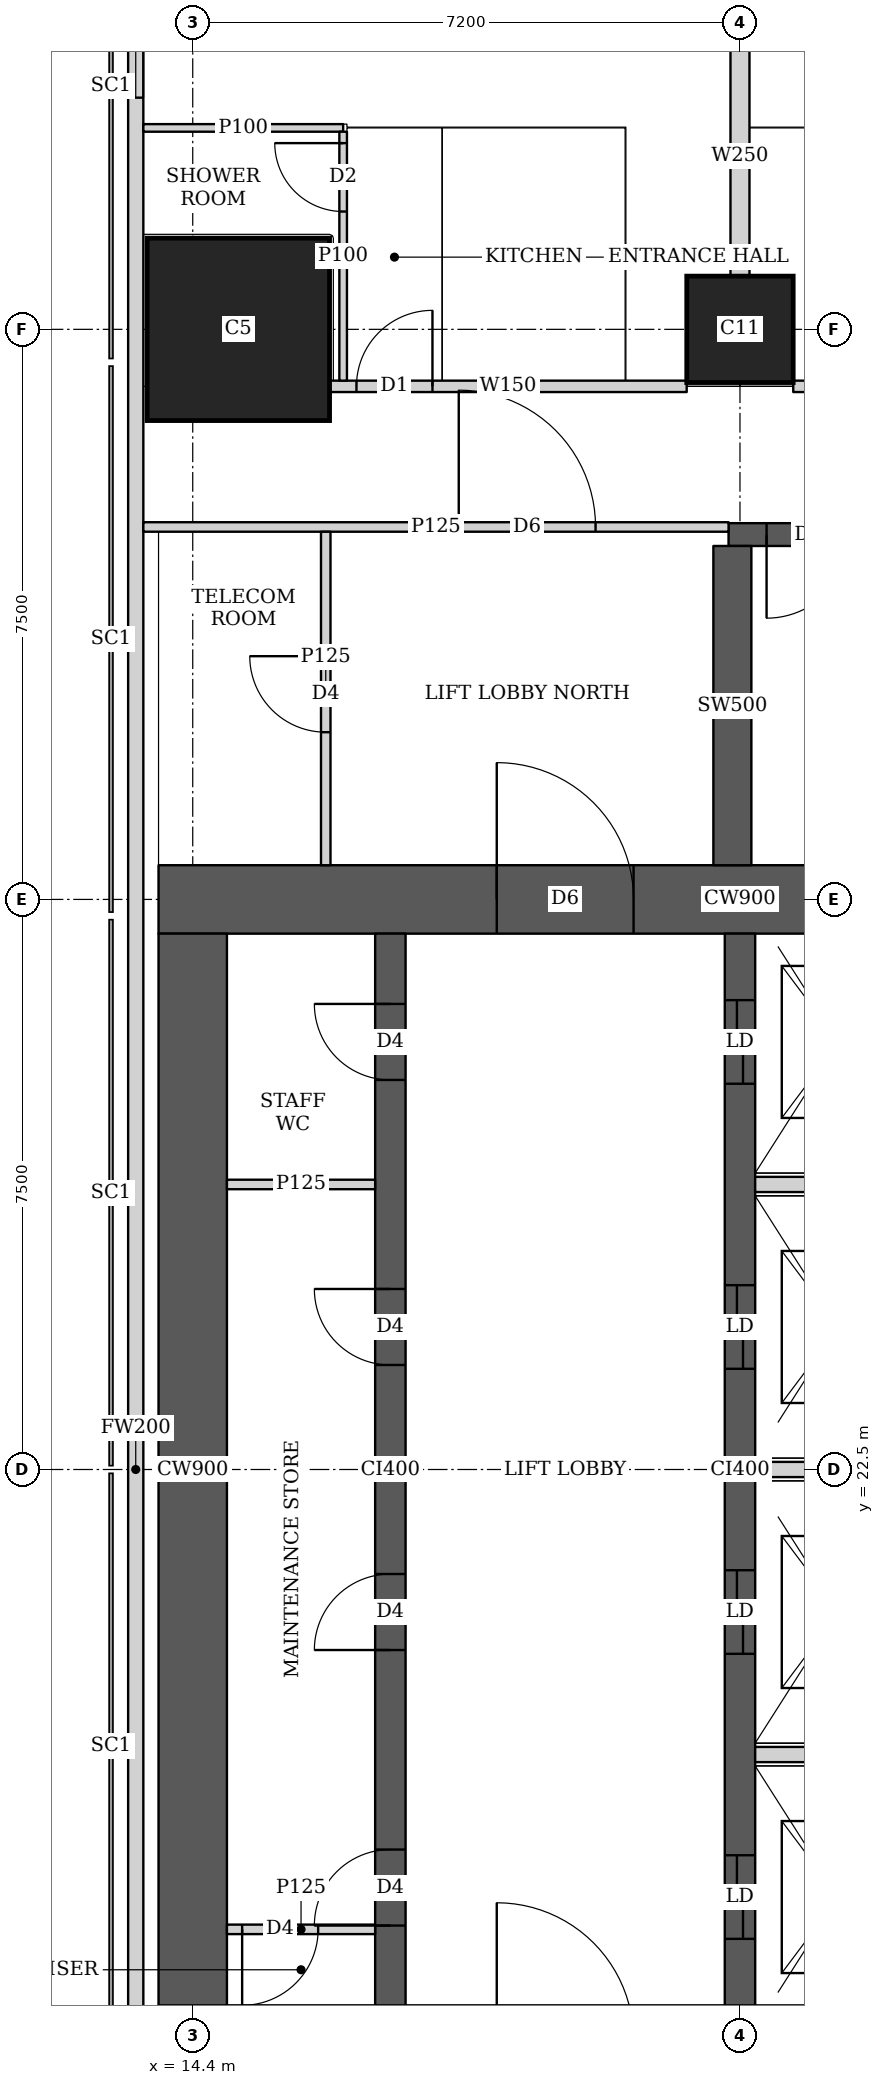
"""IFC4 building model, lengths in metres.
Left out: names, types, materials, properties, quantities, classifications, styles, units other than length and angle.
Written with IfcOpenShell. Run it as: python <this file> out.ifc"""

import sys

from ifc_helpers import new_model, si_unit, direction, frame, frame_2d, origin, origin_2d, place, context, subcontext, project, spatial, rectangle, extrude, element, fill, save


model = new_model("IFC4")
c1 = context("Model", 3, precision=1e-05, world=origin(), true_north=direction((0.0, 1.0)))
c2 = subcontext(c1, "Body", "Model", "MODEL_VIEW")
j1 = project(units=[si_unit("LENGTHUNIT", "METRE"), si_unit("PLANEANGLEUNIT", "RADIAN")], contexts=[c1])
p1 = place(None, origin())
s1 = spatial("IfcSite", under=j1, at=p1, CompositionType="ELEMENT")
p2 = place(p1, origin())
s2 = spatial("IfcBuilding", under=s1, at=p2, CompositionType="ELEMENT")
p3 = place(p2, frame((0.0, 0.0, 242.45)))
s3 = spatial("IfcBuildingStorey", under=s2, at=p3, CompositionType="ELEMENT", Elevation=242.45)
p4 = place(p3, frame((15.0, 37.5, 0.0), z_axis=(0.0, 0.0, 1.0), x_axis=(1.0, 0.0, 0.0)))
e1 = element("IfcColumn", 1, at=p4, inside=s3, PredefinedType="COLUMN", context=c2, shape_type="SweptSolid", body=[
    extrude(rectangle(XDim=2.4, YDim=2.4, at=origin_2d()), origin(), (0.0, 0.0, 1.0), 3.75),
])
p5 = place(p3, frame((21.6, 37.5, 0.0), z_axis=(0.0, 0.0, 1.0), x_axis=(1.0, 0.0, 0.0)))
e2 = element("IfcColumn", 2, at=p5, inside=s3, PredefinedType="COLUMN", context=c2, shape_type="SweptSolid", body=[
    extrude(rectangle(XDim=1.4, YDim=1.4, at=origin_2d()), origin(), (0.0, 0.0, 1.0), 3.75),
])
p6 = place(p3, frame((13.95, 30.0, 0.0), z_axis=(0.0, 0.0, 1.0), x_axis=(1.0, 0.0, 0.0)))
e3 = element("IfcWall", 3, at=p6, inside=s3, PredefinedType="SHEAR", context=c2, shape_type="SweptSolid", body=[
    extrude(rectangle(XDim=15.3, YDim=0.9, at=frame_2d((7.65, 0.0))), origin(), (0.0, 0.0, 1.0), 3.75),
])
p7 = place(p6, frame((4.45, 0.0, 0.0)))
e4 = element("IfcOpeningElement", 4, at=p7, cuts=e3, PredefinedType="OPENING", context=c2, shape_type="SweptSolid", body=[
    extrude(rectangle(XDim=1.8, YDim=2.1, at=frame_2d((0.9, 1.05))), frame((0.0, 0.46, 0.0), z_axis=(0.0, -1.0, 0.0), x_axis=(1.0, 0.0, 0.0)), (0.0, 0.0, 1.0), 0.92),
])
p8 = place(p6, frame((10.7, 0.0, 0.0)))
e5 = element("IfcOpeningElement", 5, at=p8, cuts=e3, PredefinedType="OPENING", context=c2, shape_type="SweptSolid", body=[
    extrude(rectangle(XDim=1.1, YDim=2.1, at=frame_2d((0.55, 1.05))), frame((0.0, 0.46, 0.0), z_axis=(0.0, -1.0, 0.0), x_axis=(1.0, 0.0, 0.0)), (0.0, 0.0, 1.0), 0.92),
])
p9 = place(p3, frame((14.4, 15.45, 0.0), z_axis=(0.0, 0.0, 1.0), x_axis=(0.0, 1.0, 0.0)))
e6 = element("IfcWall", 6, at=p9, inside=s3, PredefinedType="SHEAR", context=c2, shape_type="SweptSolid", body=[
    extrude(rectangle(XDim=14.1, YDim=0.9, at=frame_2d((7.05, 0.0))), origin(), (0.0, 0.0, 1.0), 3.75),
])
p10 = place(p3, frame((17.0, 15.45, 0.0), z_axis=(0.0, 0.0, 1.0), x_axis=(0.0, 1.0, 0.0)))
e7 = element("IfcWall", 7, at=p10, inside=s3, PredefinedType="SHEAR", context=c2, shape_type="SweptSolid", body=[
    extrude(rectangle(XDim=14.1, YDim=0.4, at=frame_2d((7.05, 0.0))), origin(), (0.0, 0.0, 1.0), 3.75),
])
p11 = place(p10, frame((1.05, 0.0, 0.0)))
e8 = element("IfcOpeningElement", 8, at=p11, cuts=e7, PredefinedType="OPENING", context=c2, shape_type="SweptSolid", body=[
    extrude(rectangle(XDim=1.0, YDim=2.1, at=frame_2d((0.5, 1.05))), frame((0.0, 0.21, 0.0), z_axis=(0.0, -1.0, 0.0), x_axis=(1.0, 0.0, 0.0)), (0.0, 0.0, 1.0), 0.42),
])
p12 = place(p10, frame((4.675, 0.0, 0.0)))
e9 = element("IfcOpeningElement", 9, at=p12, cuts=e7, PredefinedType="OPENING", context=c2, shape_type="SweptSolid", body=[
    extrude(rectangle(XDim=1.0, YDim=2.1, at=frame_2d((0.5, 1.05))), frame((0.0, 0.21, 0.0), z_axis=(0.0, -1.0, 0.0), x_axis=(1.0, 0.0, 0.0)), (0.0, 0.0, 1.0), 0.42),
])
p13 = place(p10, frame((8.425, 0.0, 0.0)))
e10 = element("IfcOpeningElement", 10, at=p13, cuts=e7, PredefinedType="OPENING", context=c2, shape_type="SweptSolid", body=[
    extrude(rectangle(XDim=1.0, YDim=2.1, at=frame_2d((0.5, 1.05))), frame((0.0, 0.21, 0.0), z_axis=(0.0, -1.0, 0.0), x_axis=(1.0, 0.0, 0.0)), (0.0, 0.0, 1.0), 0.42),
])
p14 = place(p10, frame((12.175, 0.0, 0.0)))
e11 = element("IfcOpeningElement", 11, at=p14, cuts=e7, PredefinedType="OPENING", context=c2, shape_type="SweptSolid", body=[
    extrude(rectangle(XDim=1.0, YDim=2.1, at=frame_2d((0.5, 1.05))), frame((0.0, 0.21, 0.0), z_axis=(0.0, -1.0, 0.0), x_axis=(1.0, 0.0, 0.0)), (0.0, 0.0, 1.0), 0.42),
])
p15 = place(p3, frame((21.6, 15.45, 0.0), z_axis=(0.0, 0.0, 1.0), x_axis=(0.0, 1.0, 0.0)))
e12 = element("IfcWall", 12, at=p15, inside=s3, PredefinedType="SHEAR", context=c2, shape_type="SweptSolid", body=[
    extrude(rectangle(XDim=14.1, YDim=0.4, at=frame_2d((7.05, 0.0))), origin(), (0.0, 0.0, 1.0), 3.75),
])
p16 = place(p15, frame((0.875, 0.0, 0.0)))
e13 = element("IfcOpeningElement", 13, at=p16, cuts=e12, PredefinedType="OPENING", context=c2, shape_type="SweptSolid", body=[
    extrude(rectangle(XDim=1.1, YDim=2.1, at=frame_2d((0.55, 1.05))), frame((0.0, 0.21, 0.0), z_axis=(0.0, -1.0, 0.0), x_axis=(1.0, 0.0, 0.0)), (0.0, 0.0, 1.0), 0.42),
])
p17 = place(p15, frame((4.625, 0.0, 0.0)))
e14 = element("IfcOpeningElement", 14, at=p17, cuts=e12, PredefinedType="OPENING", context=c2, shape_type="SweptSolid", body=[
    extrude(rectangle(XDim=1.1, YDim=2.1, at=frame_2d((0.55, 1.05))), frame((0.0, 0.21, 0.0), z_axis=(0.0, -1.0, 0.0), x_axis=(1.0, 0.0, 0.0)), (0.0, 0.0, 1.0), 0.42),
])
p18 = place(p15, frame((8.375, 0.0, 0.0)))
e15 = element("IfcOpeningElement", 15, at=p18, cuts=e12, PredefinedType="OPENING", context=c2, shape_type="SweptSolid", body=[
    extrude(rectangle(XDim=1.1, YDim=2.1, at=frame_2d((0.55, 1.05))), frame((0.0, 0.21, 0.0), z_axis=(0.0, -1.0, 0.0), x_axis=(1.0, 0.0, 0.0)), (0.0, 0.0, 1.0), 0.42),
])
p19 = place(p15, frame((12.125, 0.0, 0.0)))
e16 = element("IfcOpeningElement", 16, at=p19, cuts=e12, PredefinedType="OPENING", context=c2, shape_type="SweptSolid", body=[
    extrude(rectangle(XDim=1.1, YDim=2.1, at=frame_2d((0.55, 1.05))), frame((0.0, 0.21, 0.0), z_axis=(0.0, -1.0, 0.0), x_axis=(1.0, 0.0, 0.0)), (0.0, 0.0, 1.0), 0.42),
])
p20 = place(p3, frame((21.45, 34.8, 0.0), z_axis=(0.0, 0.0, 1.0), x_axis=(1.0, 0.0, 0.0)))
e17 = element("IfcWall", 17, at=p20, inside=s3, PredefinedType="SHEAR", context=c2, shape_type="SweptSolid", body=[
    extrude(rectangle(XDim=7.5, YDim=0.3, at=frame_2d((3.75, 0.0))), origin(), (0.0, 0.0, 1.0), 3.75),
])
p21 = place(p20, frame((0.5, 0.0, 0.0)))
e18 = element("IfcOpeningElement", 18, at=p21, cuts=e17, PredefinedType="OPENING", context=c2, shape_type="SweptSolid", body=[
    extrude(rectangle(XDim=1.1, YDim=2.1, at=frame_2d((0.55, 1.05))), frame((0.0, 0.16, 0.0), z_axis=(0.0, -1.0, 0.0), x_axis=(1.0, 0.0, 0.0)), (0.0, 0.0, 1.0), 0.32),
])
p22 = place(p3, frame((21.5, 30.45, 0.0), z_axis=(0.0, 0.0, 1.0), x_axis=(0.0, 1.0, 0.0)))
e19 = element("IfcWall", 19, at=p22, inside=s3, PredefinedType="SHEAR", context=c2, shape_type="SweptSolid", body=[
    extrude(rectangle(XDim=4.2, YDim=0.5, at=frame_2d((2.1, 0.0))), origin(), (0.0, 0.0, 1.0), 3.75),
])
p23 = place(p3, frame((13.65, 44.837, 0.0), z_axis=(0.0, 0.0, 1.0), x_axis=(0.0, -1.0, 0.0)))
e20 = element("IfcWall", 20, at=p23, inside=s3, PredefinedType="SOLIDWALL", context=c2, shape_type="SweptSolid", body=[
    extrude(rectangle(XDim=44.674, YDim=0.2, at=frame_2d((22.337, 0.0))), origin(), (0.0, 0.0, 1.0), 3.45),
])
p24 = place(p23, frame((1.889, 0.0, 0.9)))
e21 = element("IfcOpeningElement", 21, at=p24, cuts=e20, PredefinedType="OPENING", context=c2, shape_type="SweptSolid", body=[
    extrude(rectangle(XDim=2.4, YDim=1.5, at=frame_2d((1.2, 0.75))), frame((0.0, 0.11, 0.0), z_axis=(0.0, -1.0, 0.0), x_axis=(1.0, 0.0, 0.0)), (0.0, 0.0, 1.0), 0.22),
])
p25 = place(p23, frame((40.385, 0.0, 0.9)))
e22 = element("IfcOpeningElement", 22, at=p25, cuts=e20, PredefinedType="OPENING", context=c2, shape_type="SweptSolid", body=[
    extrude(rectangle(XDim=2.4, YDim=1.5, at=frame_2d((1.2, 0.75))), frame((0.0, 0.11, 0.0), z_axis=(0.0, -1.0, 0.0), x_axis=(1.0, 0.0, 0.0)), (0.0, 0.0, 1.0), 0.22),
])
p26 = place(p3, frame((16.201, 36.75, 0.0), z_axis=(0.0, 0.0, 1.0), x_axis=(1.0, 0.0, 0.0)))
e23 = element("IfcWall", 23, at=p26, inside=s3, PredefinedType="SOLIDWALL", context=c2, shape_type="SweptSolid", body=[
    extrude(rectangle(XDim=4.698, YDim=0.15, at=frame_2d((2.349, 0.0))), origin(), (0.0, 0.0, 1.0), 3.45),
])
p27 = place(p26, frame((0.353, 0.0, 0.0)))
e24 = element("IfcOpeningElement", 24, at=p27, cuts=e23, PredefinedType="OPENING", context=c2, shape_type="SweptSolid", body=[
    extrude(rectangle(XDim=1.0, YDim=2.1, at=frame_2d((0.5, 1.05))), frame((0.0, 0.085, 0.0), z_axis=(0.0, -1.0, 0.0), x_axis=(1.0, 0.0, 0.0)), (0.0, 0.0, 1.0), 0.17),
])
p28 = place(p3, frame((22.301, 36.75, 0.0), z_axis=(0.0, 0.0, 1.0), x_axis=(1.0, 0.0, 0.0)))
e25 = element("IfcWall", 25, at=p28, inside=s3, PredefinedType="SOLIDWALL", context=c2, shape_type="SweptSolid", body=[
    extrude(rectangle(XDim=5.798, YDim=0.15, at=frame_2d((2.899, 0.0))), origin(), (0.0, 0.0, 1.0), 3.45),
])
p29 = place(p28, frame((0.799, 0.0, 0.0)))
e26 = element("IfcOpeningElement", 26, at=p29, cuts=e25, PredefinedType="OPENING", context=c2, shape_type="SweptSolid", body=[
    extrude(rectangle(XDim=1.0, YDim=2.1, at=frame_2d((0.5, 1.05))), frame((0.0, 0.085, 0.0), z_axis=(0.0, -1.0, 0.0), x_axis=(1.0, 0.0, 0.0)), (0.0, 0.0, 1.0), 0.17),
])
p30 = place(p3, frame((13.75, 40.15, 0.0), z_axis=(0.0, 0.0, 1.0), x_axis=(1.0, 0.0, 0.0)))
e27 = element("IfcWall", 27, at=p30, inside=s3, PredefinedType="PARTITIONING", context=c2, shape_type="SweptSolid", body=[
    extrude(rectangle(XDim=2.629, YDim=0.1, at=frame_2d((1.314, 0.0))), origin(), (0.0, 0.0, 1.0), 2.0),
])
p31 = place(p3, frame((16.379, 36.825, 0.0), z_axis=(0.0, 0.0, 1.0), x_axis=(0.0, 1.0, 0.0)))
e28 = element("IfcWall", 28, at=p31, inside=s3, PredefinedType="PARTITIONING", context=c2, shape_type="SweptSolid", body=[
    extrude(rectangle(XDim=3.275, YDim=0.1, at=frame_2d((1.638, 0.0))), origin(), (0.0, 0.0, 1.0), 3.45),
])
p32 = place(p31, frame((2.225, 0.0, 0.0)))
e29 = element("IfcOpeningElement", 29, at=p32, cuts=e28, PredefinedType="OPENING", context=c2, shape_type="SweptSolid", body=[
    extrude(rectangle(XDim=0.9, YDim=2.1, at=frame_2d((0.45, 1.05))), frame((0.0, 0.06, 0.0), z_axis=(0.0, -1.0, 0.0), x_axis=(1.0, 0.0, 0.0)), (0.0, 0.0, 1.0), 0.12),
])
p33 = place(p3, frame((21.6, 38.201, 0.0), z_axis=(0.0, 0.0, 1.0), x_axis=(0.0, 1.0, 0.0)))
e30 = element("IfcWall", 30, at=p33, inside=s3, PredefinedType="SOLIDWALL", context=c2, shape_type="SweptSolid", body=[
    extrude(rectangle(XDim=3.149, YDim=0.25, at=frame_2d((1.575, 0.0))), origin(), (0.0, 0.0, 1.0), 3.45),
])
p34 = place(p3, frame((13.75, 34.9, 0.0), z_axis=(0.0, 0.0, 1.0), x_axis=(1.0, 0.0, 0.0)))
e31 = element("IfcWall", 31, at=p34, inside=s3, PredefinedType="PARTITIONING", context=c2, shape_type="SweptSolid", body=[
    extrude(rectangle(XDim=7.7, YDim=0.125, at=frame_2d((3.85, 0.0))), origin(), (0.0, 0.0, 1.0), 3.45),
])
p35 = place(p34, frame((4.15, 0.0, 0.0)))
e32 = element("IfcOpeningElement", 32, at=p35, cuts=e31, PredefinedType="OPENING", context=c2, shape_type="SweptSolid", body=[
    extrude(rectangle(XDim=1.8, YDim=2.1, at=frame_2d((0.9, 1.05))), frame((0.0, 0.073, 0.0), z_axis=(0.0, -1.0, 0.0), x_axis=(1.0, 0.0, 0.0)), (0.0, 0.0, 1.0), 0.145),
])
p36 = place(p3, frame((16.15, 30.45, 0.0), z_axis=(0.0, 0.0, 1.0), x_axis=(0.0, 1.0, 0.0)))
e33 = element("IfcWall", 33, at=p36, inside=s3, PredefinedType="PARTITIONING", context=c2, shape_type="SweptSolid", body=[
    extrude(rectangle(XDim=4.387, YDim=0.125, at=frame_2d((2.193, 0.0))), origin(), (0.0, 0.0, 1.0), 3.45),
])
p37 = place(p36, frame((1.75, 0.0, 0.0)))
e34 = element("IfcOpeningElement", 34, at=p37, cuts=e33, PredefinedType="OPENING", context=c2, shape_type="SweptSolid", body=[
    extrude(rectangle(XDim=1.0, YDim=2.1, at=frame_2d((0.5, 1.05))), frame((0.0, 0.073, 0.0), z_axis=(0.0, -1.0, 0.0), x_axis=(1.0, 0.0, 0.0)), (0.0, 0.0, 1.0), 0.145),
])
p38 = place(p3, frame((14.85, 16.45, 0.0), z_axis=(0.0, 0.0, 1.0), x_axis=(1.0, 0.0, 0.0)))
e35 = element("IfcWall", 35, at=p38, inside=s3, PredefinedType="PARTITIONING", context=c2, shape_type="SweptSolid", body=[
    extrude(rectangle(XDim=1.95, YDim=0.125, at=frame_2d((0.975, 0.0))), origin(), (0.0, 0.0, 1.0), 3.45),
])
p39 = place(p38, frame((0.2, 0.0, 0.0)))
e36 = element("IfcOpeningElement", 36, at=p39, cuts=e35, PredefinedType="OPENING", context=c2, shape_type="SweptSolid", body=[
    extrude(rectangle(XDim=1.0, YDim=2.1, at=frame_2d((0.5, 1.05))), frame((0.0, 0.073, 0.0), z_axis=(0.0, -1.0, 0.0), x_axis=(1.0, 0.0, 0.0)), (0.0, 0.0, 1.0), 0.145),
])
p40 = place(p3, frame((14.85, 26.25, 0.0), z_axis=(0.0, 0.0, 1.0), x_axis=(1.0, 0.0, 0.0)))
e37 = element("IfcWall", 37, at=p40, inside=s3, PredefinedType="PARTITIONING", context=c2, shape_type="SweptSolid", body=[
    extrude(rectangle(XDim=1.95, YDim=0.125, at=frame_2d((0.975, 0.0))), origin(), (0.0, 0.0, 1.0), 3.45),
])
for number, where, z_axis, x_axis in (
    (38, (21.8, 18.75, 0.0), (0.0, 0.0, 1.0), (1.0, 0.0, 0.0)),
    (39, (21.8, 22.5, 0.0), (0.0, 0.0, 1.0), (1.0, 0.0, 0.0)),
    (40, (21.8, 26.25, 0.0), (0.0, 0.0, 1.0), (1.0, 0.0, 0.0)),
):
    element("IfcWall", number, at=place(p3, frame(where, z_axis=z_axis, x_axis=x_axis)), inside=s3, PredefinedType="SOLIDWALL", context=c2, shape_type="SweptSolid", body=[
        extrude(rectangle(XDim=2.2, YDim=0.2, at=frame_2d((1.1, 0.0))), origin(), (0.0, 0.0, 1.0), 3.45),
    ])
p41 = place(p24, origin())
e41 = element("IfcWindow", 41, at=p41, inside=s3, PartitioningType="SINGLE_PANEL", PredefinedType="WINDOW", context=c2, shape_type="SweptSolid", body=[
    extrude(rectangle(XDim=2.4, YDim=1.5, at=frame_2d((1.2, 0.75))), frame((0.0, 0.03, 0.0), z_axis=(0.0, -1.0, 0.0), x_axis=(1.0, 0.0, 0.0)), (0.0, 0.0, 1.0), 0.06),
])
fill(e21, e41)
p42 = place(p32, origin())
e42 = element("IfcDoor", 42, at=p42, inside=s3, OperationType="SINGLE_SWING_RIGHT", PredefinedType="DOOR", context=c2, shape_type="SweptSolid", body=[
    extrude(rectangle(XDim=0.9, YDim=2.1, at=frame_2d((0.45, 1.05))), frame((0.0, 0.025, 0.0), z_axis=(0.0, -1.0, 0.0), x_axis=(1.0, 0.0, 0.0)), (0.0, 0.0, 1.0), 0.05),
])
fill(e29, e42)
p43 = place(p27, origin())
e43 = element("IfcDoor", 43, at=p43, inside=s3, OperationType="SINGLE_SWING_RIGHT", PredefinedType="DOOR", context=c2, shape_type="SweptSolid", body=[
    extrude(rectangle(XDim=1.0, YDim=2.1, at=frame_2d((0.5, 1.05))), frame((0.0, 0.025, 0.0), z_axis=(0.0, -1.0, 0.0), x_axis=(1.0, 0.0, 0.0)), (0.0, 0.0, 1.0), 0.05),
])
fill(e24, e43)
p44 = place(p37, origin())
e44 = element("IfcDoor", 44, at=p44, inside=s3, OperationType="SINGLE_SWING_RIGHT", PredefinedType="DOOR", context=c2, shape_type="SweptSolid", body=[
    extrude(rectangle(XDim=1.0, YDim=2.1, at=frame_2d((0.5, 1.05))), frame((0.0, 0.025, 0.0), z_axis=(0.0, -1.0, 0.0), x_axis=(1.0, 0.0, 0.0)), (0.0, 0.0, 1.0), 0.05),
])
fill(e34, e44)
p45 = place(p35, origin())
e45 = element("IfcDoor", 45, at=p45, inside=s3, OperationType="DOUBLE_DOOR_SINGLE_SWING", PredefinedType="DOOR", context=c2, shape_type="SweptSolid", body=[
    extrude(rectangle(XDim=1.8, YDim=2.1, at=frame_2d((0.9, 1.05))), frame((0.0, 0.025, 0.0), z_axis=(0.0, -1.0, 0.0), x_axis=(1.0, 0.0, 0.0)), (0.0, 0.0, 1.0), 0.05),
])
fill(e32, e45)
p46 = place(p39, origin())
e46 = element("IfcDoor", 46, at=p46, inside=s3, OperationType="SINGLE_SWING_RIGHT", PredefinedType="DOOR", context=c2, shape_type="SweptSolid", body=[
    extrude(rectangle(XDim=1.0, YDim=2.1, at=frame_2d((0.5, 1.05))), frame((0.0, 0.025, 0.0), z_axis=(0.0, -1.0, 0.0), x_axis=(1.0, 0.0, 0.0)), (0.0, 0.0, 1.0), 0.05),
])
fill(e36, e46)
p47 = place(p11, origin())
e47 = element("IfcDoor", 47, at=p47, inside=s3, OperationType="SINGLE_SWING_LEFT", PredefinedType="DOOR", context=c2, shape_type="SweptSolid", body=[
    extrude(rectangle(XDim=1.0, YDim=2.1, at=frame_2d((0.5, 1.05))), frame((0.0, 0.025, 0.0), z_axis=(0.0, -1.0, 0.0), x_axis=(1.0, 0.0, 0.0)), (0.0, 0.0, 1.0), 0.05),
])
fill(e8, e47)
p48 = place(p12, origin())
e48 = element("IfcDoor", 48, at=p48, inside=s3, OperationType="SINGLE_SWING_LEFT", PredefinedType="DOOR", context=c2, shape_type="SweptSolid", body=[
    extrude(rectangle(XDim=1.0, YDim=2.1, at=frame_2d((0.5, 1.05))), frame((0.0, 0.025, 0.0), z_axis=(0.0, -1.0, 0.0), x_axis=(1.0, 0.0, 0.0)), (0.0, 0.0, 1.0), 0.05),
])
fill(e9, e48)
p49 = place(p13, origin())
e49 = element("IfcDoor", 49, at=p49, inside=s3, OperationType="SINGLE_SWING_RIGHT", PredefinedType="DOOR", context=c2, shape_type="SweptSolid", body=[
    extrude(rectangle(XDim=1.0, YDim=2.1, at=frame_2d((0.5, 1.05))), frame((0.0, 0.025, 0.0), z_axis=(0.0, -1.0, 0.0), x_axis=(1.0, 0.0, 0.0)), (0.0, 0.0, 1.0), 0.05),
])
fill(e10, e49)
p50 = place(p14, origin())
e50 = element("IfcDoor", 50, at=p50, inside=s3, OperationType="SINGLE_SWING_RIGHT", PredefinedType="DOOR", context=c2, shape_type="SweptSolid", body=[
    extrude(rectangle(XDim=1.0, YDim=2.1, at=frame_2d((0.5, 1.05))), frame((0.0, 0.025, 0.0), z_axis=(0.0, -1.0, 0.0), x_axis=(1.0, 0.0, 0.0)), (0.0, 0.0, 1.0), 0.05),
])
fill(e11, e50)
p51 = place(p7, origin())
e51 = element("IfcDoor", 51, at=p51, inside=s3, OperationType="DOUBLE_DOOR_SINGLE_SWING", PredefinedType="DOOR", context=c2, shape_type="SweptSolid", body=[
    extrude(rectangle(XDim=1.8, YDim=2.1, at=frame_2d((0.9, 1.05))), frame((0.0, 0.025, 0.0), z_axis=(0.0, -1.0, 0.0), x_axis=(1.0, 0.0, 0.0)), (0.0, 0.0, 1.0), 0.05),
])
fill(e4, e51)
p52 = place(p16, origin())
e52 = element("IfcDoor", 52, at=p52, inside=s3, OperationType="DOUBLE_DOOR_SLIDING", PredefinedType="DOOR", context=c2, shape_type="SweptSolid", body=[
    extrude(rectangle(XDim=1.1, YDim=2.1, at=frame_2d((0.55, 1.05))), frame((0.0, 0.025, 0.0), z_axis=(0.0, -1.0, 0.0), x_axis=(1.0, 0.0, 0.0)), (0.0, 0.0, 1.0), 0.05),
])
fill(e13, e52)
p53 = place(p17, origin())
e53 = element("IfcDoor", 53, at=p53, inside=s3, OperationType="DOUBLE_DOOR_SLIDING", PredefinedType="DOOR", context=c2, shape_type="SweptSolid", body=[
    extrude(rectangle(XDim=1.1, YDim=2.1, at=frame_2d((0.55, 1.05))), frame((0.0, 0.025, 0.0), z_axis=(0.0, -1.0, 0.0), x_axis=(1.0, 0.0, 0.0)), (0.0, 0.0, 1.0), 0.05),
])
fill(e14, e53)
p54 = place(p18, origin())
e54 = element("IfcDoor", 54, at=p54, inside=s3, OperationType="DOUBLE_DOOR_SLIDING", PredefinedType="DOOR", context=c2, shape_type="SweptSolid", body=[
    extrude(rectangle(XDim=1.1, YDim=2.1, at=frame_2d((0.55, 1.05))), frame((0.0, 0.025, 0.0), z_axis=(0.0, -1.0, 0.0), x_axis=(1.0, 0.0, 0.0)), (0.0, 0.0, 1.0), 0.05),
])
fill(e15, e54)
p55 = place(p19, origin())
e55 = element("IfcDoor", 55, at=p55, inside=s3, OperationType="DOUBLE_DOOR_SLIDING", PredefinedType="DOOR", context=c2, shape_type="SweptSolid", body=[
    extrude(rectangle(XDim=1.1, YDim=2.1, at=frame_2d((0.55, 1.05))), frame((0.0, 0.025, 0.0), z_axis=(0.0, -1.0, 0.0), x_axis=(1.0, 0.0, 0.0)), (0.0, 0.0, 1.0), 0.05),
])
fill(e16, e55)
p56 = place(p21, origin())
e56 = element("IfcDoor", 56, at=p56, inside=s3, OperationType="SINGLE_SWING_RIGHT", PredefinedType="DOOR", context=c2, shape_type="SweptSolid", body=[
    extrude(rectangle(XDim=1.1, YDim=2.1, at=frame_2d((0.55, 1.05))), frame((0.0, 0.025, 0.0), z_axis=(0.0, -1.0, 0.0), x_axis=(1.0, 0.0, 0.0)), (0.0, 0.0, 1.0), 0.05),
])
fill(e18, e56)
save(model, sys.argv[1])
